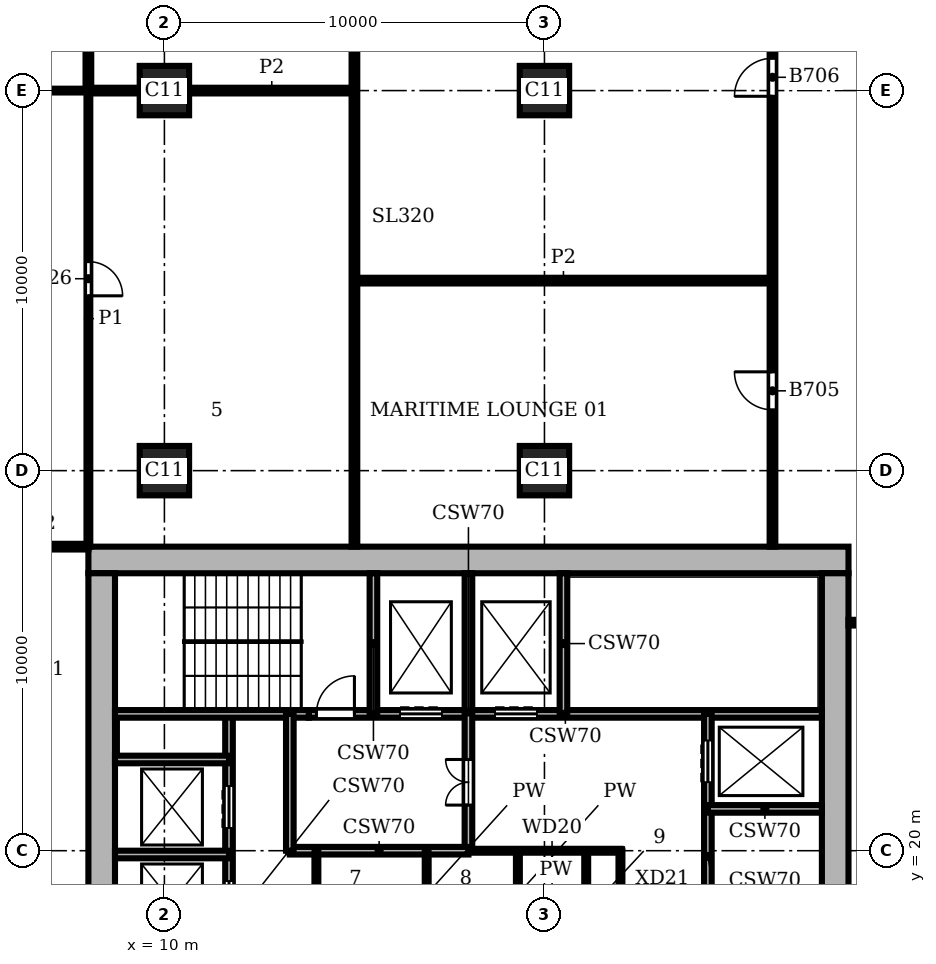
"""IFC4 building model, lengths in metres.
Left out: names, types, materials, properties, quantities, classifications, styles, units other than length and angle.
Written with IfcOpenShell. Run it as: python <this file> out.ifc"""

import sys

from ifc_helpers import new_model, si_unit, direction, frame, frame_2d, origin, origin_2d, place, context, subcontext, project, spatial, rectangle, extrude, element, fill, save


model = new_model("IFC4")
c1 = context("Model", 3, precision=1e-05, world=origin(), true_north=direction((0.0, 1.0)))
c2 = subcontext(c1, "Body", "Model", "MODEL_VIEW")
j1 = project(units=[si_unit("LENGTHUNIT", "METRE"), si_unit("PLANEANGLEUNIT", "RADIAN")], contexts=[c1])
p1 = place(None, origin())
s1 = spatial("IfcSite", under=j1, at=p1, CompositionType="ELEMENT")
p2 = place(p1, origin())
s2 = spatial("IfcBuilding", under=s1, at=p2, CompositionType="ELEMENT")
p3 = place(p2, frame((0.0, 0.0, 209.7)))
s3 = spatial("IfcBuildingStorey", under=s2, at=p3, CompositionType="ELEMENT", Elevation=209.7)
for number, where, z_axis, x_axis in (
    (1, (10.0, 30.0, 0.0), (0.0, 0.0, 1.0), (1.0, 0.0, 0.0)),
    (2, (10.0, 40.0, 0.0), (0.0, 0.0, 1.0), (1.0, 0.0, 0.0)),
    (3, (20.0, 30.0, 0.0), (0.0, 0.0, 1.0), (1.0, 0.0, 0.0)),
    (4, (20.0, 40.0, 0.0), (0.0, 0.0, 1.0), (1.0, 0.0, 0.0)),
):
    element("IfcColumn", number, at=place(p3, frame(where, z_axis=z_axis, x_axis=x_axis)), inside=s3, PredefinedType="COLUMN", context=c2, shape_type="SweptSolid", body=[
        extrude(rectangle(XDim=1.3, YDim=1.3, at=origin_2d()), origin(), (0.0, 0.0, 1.0), 3.9),
    ])
p4 = place(p3, frame((27.65, 8.7, 0.0), z_axis=(0.0, 0.0, 1.0), x_axis=(0.0, 1.0, 0.0)))
e5 = element("IfcWall", 5, at=p4, inside=s3, PredefinedType="SHEAR", context=c2, shape_type="SweptSolid", body=[
    extrude(rectangle(XDim=18.6, YDim=0.7, at=frame_2d((9.3, 0.0))), origin(), (0.0, 0.0, 1.0), 3.9),
])
p5 = place(p4, frame((4.75, 0.0, 0.0)))
e6 = element("IfcOpeningElement", 6, at=p5, cuts=e5, PredefinedType="OPENING", context=c2, shape_type="SweptSolid", body=[
    extrude(rectangle(XDim=1.6, YDim=2.1, at=frame_2d((0.8, 1.05))), frame((0.0, 0.36, 0.0), z_axis=(0.0, -1.0, 0.0), x_axis=(1.0, 0.0, 0.0)), (0.0, 0.0, 1.0), 0.72),
])
p6 = place(p3, frame((28.0, 27.65, 0.0), z_axis=(0.0, 0.0, 1.0), x_axis=(-1.0, 0.0, 0.0)))
e7 = element("IfcWall", 7, at=p6, inside=s3, PredefinedType="SHEAR", context=c2, shape_type="SweptSolid", body=[
    extrude(rectangle(XDim=20.0, YDim=0.7, at=frame_2d((10.0, 0.0))), origin(), (0.0, 0.0, 1.0), 3.9),
])
p7 = place(p3, frame((8.35, 27.3, 0.0), z_axis=(0.0, 0.0, 1.0), x_axis=(0.0, -1.0, 0.0)))
e8 = element("IfcWall", 8, at=p7, inside=s3, PredefinedType="SHEAR", context=c2, shape_type="SweptSolid", body=[
    extrude(rectangle(XDim=18.6, YDim=0.7, at=frame_2d((9.3, 0.0))), origin(), (0.0, 0.0, 1.0), 3.9),
])
p8 = place(p3, frame((8.7, 19.9, 0.0), z_axis=(0.0, 0.0, 1.0), x_axis=(1.0, 0.0, 0.0)))
e9 = element("IfcWall", 9, at=p8, inside=s3, PredefinedType="SHEAR", context=c2, shape_type="SweptSolid", body=[
    extrude(rectangle(XDim=3.0, YDim=0.2, at=frame_2d((1.5, 0.0))), origin(), (0.0, 0.0, 1.0), 3.58),
])
p9 = place(p3, frame((18.0, 20.0, 0.0), z_axis=(0.0, 0.0, 1.0), x_axis=(1.0, 0.0, 0.0)))
e10 = element("IfcWall", 10, at=p9, inside=s3, PredefinedType="PARTITIONING", context=c2, shape_type="SweptSolid", body=[
    extrude(rectangle(XDim=4.0, YDim=0.1, at=frame_2d((2.0, 0.0))), origin(), (0.0, 0.0, 1.0), 3.58),
])
p10 = place(p3, frame((13.3, 20.0, 0.0), z_axis=(0.0, 0.0, 1.0), x_axis=(1.0, 0.0, 0.0)))
e11 = element("IfcWall", 11, at=p10, inside=s3, PredefinedType="SHEAR", context=c2, shape_type="SweptSolid", body=[
    extrude(rectangle(XDim=4.7, YDim=0.2, at=frame_2d((2.35, 0.0))), origin(), (0.0, 0.0, 1.0), 3.58),
])
for number, where, z_axis, x_axis in (
    (12, (24.3, 21.1, 0.0), (0.0, 0.0, 1.0), (1.0, 0.0, 0.0)),
    (13, (8.7, 22.4, 0.0), (0.0, 0.0, 1.0), (1.0, 0.0, 0.0)),
):
    element("IfcWall", number, at=place(p3, frame(where, z_axis=z_axis, x_axis=x_axis)), inside=s3, PredefinedType="SHEAR", context=c2, shape_type="SweptSolid", body=[
        extrude(rectangle(XDim=3.0, YDim=0.2, at=frame_2d((1.5, 0.0))), origin(), (0.0, 0.0, 1.0), 3.58),
    ])
p11 = place(p3, frame((8.7, 23.6, 0.0), z_axis=(0.0, 0.0, 1.0), x_axis=(1.0, 0.0, 0.0)))
e14 = element("IfcWall", 14, at=p11, inside=s3, PredefinedType="SHEAR", context=c2, shape_type="SweptSolid", body=[
    extrude(rectangle(XDim=5.1, YDim=0.2, at=frame_2d((2.55, 0.0))), origin(), (0.0, 0.0, 1.0), 3.58),
])
p12 = place(p3, frame((13.8, 23.6, 0.0), z_axis=(0.0, 0.0, 1.0), x_axis=(1.0, 0.0, 0.0)))
e15 = element("IfcWall", 15, at=p12, inside=s3, PredefinedType="SHEAR", context=c2, shape_type="SweptSolid", body=[
    extrude(rectangle(XDim=13.5, YDim=0.2, at=frame_2d((6.75, 0.0))), origin(), (0.0, 0.0, 1.0), 3.58),
])
p13 = place(p12, frame((2.4, 0.0, 0.0)))
e16 = element("IfcOpeningElement", 16, at=p13, cuts=e15, PredefinedType="OPENING", context=c2, shape_type="SweptSolid", body=[
    extrude(rectangle(XDim=1.1, YDim=2.1, at=frame_2d((0.55, 1.05))), frame((0.0, 0.11, 0.0), z_axis=(0.0, -1.0, 0.0), x_axis=(1.0, 0.0, 0.0)), (0.0, 0.0, 1.0), 0.22),
])
p14 = place(p12, frame((4.9, 0.0, 0.0)))
e17 = element("IfcOpeningElement", 17, at=p14, cuts=e15, PredefinedType="OPENING", context=c2, shape_type="SweptSolid", body=[
    extrude(rectangle(XDim=1.1, YDim=2.1, at=frame_2d((0.55, 1.05))), frame((0.0, 0.11, 0.0), z_axis=(0.0, -1.0, 0.0), x_axis=(1.0, 0.0, 0.0)), (0.0, 0.0, 1.0), 0.22),
])
p15 = place(p12, frame((0.2, 0.0, 0.0)))
e18 = element("IfcOpeningElement", 18, at=p15, cuts=e15, PredefinedType="OPENING", context=c2, shape_type="SweptSolid", body=[
    extrude(rectangle(XDim=1.0, YDim=2.1, at=frame_2d((0.5, 1.05))), frame((0.0, 0.11, 0.0), z_axis=(0.0, -1.0, 0.0), x_axis=(1.0, 0.0, 0.0)), (0.0, 0.0, 1.0), 0.22),
])
p16 = place(p3, frame((11.7, 12.4, 0.0), z_axis=(0.0, 0.0, 1.0), x_axis=(0.0, 1.0, 0.0)))
e19 = element("IfcWall", 19, at=p16, inside=s3, PredefinedType="SHEAR", context=c2, shape_type="SweptSolid", body=[
    extrude(rectangle(XDim=11.2, YDim=0.2, at=frame_2d((5.6, 0.0))), origin(), (0.0, 0.0, 1.0), 3.58),
])
p17 = place(p16, frame((0.7, 0.0, 0.0)))
e20 = element("IfcOpeningElement", 20, at=p17, cuts=e19, PredefinedType="OPENING", context=c2, shape_type="SweptSolid", body=[
    extrude(rectangle(XDim=1.1, YDim=2.1, at=frame_2d((0.55, 1.05))), frame((0.0, 0.11, 0.0), z_axis=(0.0, -1.0, 0.0), x_axis=(1.0, 0.0, 0.0)), (0.0, 0.0, 1.0), 0.22),
])
p18 = place(p16, frame((3.2, 0.0, 0.0)))
e21 = element("IfcOpeningElement", 21, at=p18, cuts=e19, PredefinedType="OPENING", context=c2, shape_type="SweptSolid", body=[
    extrude(rectangle(XDim=1.1, YDim=2.1, at=frame_2d((0.55, 1.05))), frame((0.0, 0.11, 0.0), z_axis=(0.0, -1.0, 0.0), x_axis=(1.0, 0.0, 0.0)), (0.0, 0.0, 1.0), 0.22),
])
p19 = place(p16, frame((5.7, 0.0, 0.0)))
e22 = element("IfcOpeningElement", 22, at=p19, cuts=e19, PredefinedType="OPENING", context=c2, shape_type="SweptSolid", body=[
    extrude(rectangle(XDim=1.1, YDim=2.1, at=frame_2d((0.55, 1.05))), frame((0.0, 0.11, 0.0), z_axis=(0.0, -1.0, 0.0), x_axis=(1.0, 0.0, 0.0)), (0.0, 0.0, 1.0), 0.22),
])
p20 = place(p16, frame((8.2, 0.0, 0.0)))
e23 = element("IfcOpeningElement", 23, at=p20, cuts=e19, PredefinedType="OPENING", context=c2, shape_type="SweptSolid", body=[
    extrude(rectangle(XDim=1.1, YDim=2.1, at=frame_2d((0.55, 1.05))), frame((0.0, 0.11, 0.0), z_axis=(0.0, -1.0, 0.0), x_axis=(1.0, 0.0, 0.0)), (0.0, 0.0, 1.0), 0.22),
])
p21 = place(p3, frame((13.3, 20.0, 0.0), z_axis=(0.0, 0.0, 1.0), x_axis=(0.0, 1.0, 0.0)))
e24 = element("IfcWall", 24, at=p21, inside=s3, PredefinedType="SHEAR", context=c2, shape_type="SweptSolid", body=[
    extrude(rectangle(XDim=3.6, YDim=0.2, at=frame_2d((1.8, 0.0))), origin(), (0.0, 0.0, 1.0), 3.58),
])
p22 = place(p3, frame((14.0, 16.2, 0.0), z_axis=(0.0, 0.0, 1.0), x_axis=(0.0, 1.0, 0.0)))
e25 = element("IfcWall", 25, at=p22, inside=s3, PredefinedType="PARTITIONING", context=c2, shape_type="SweptSolid", body=[
    extrude(rectangle(XDim=3.8, YDim=0.1, at=frame_2d((1.9, 0.0))), origin(), (0.0, 0.0, 1.0), 3.58),
])
p23 = place(p3, frame((15.5, 23.6, 0.0), z_axis=(0.0, 0.0, 1.0), x_axis=(0.0, 1.0, 0.0)))
e26 = element("IfcWall", 26, at=p23, inside=s3, PredefinedType="SHEAR", context=c2, shape_type="SweptSolid", body=[
    extrude(rectangle(XDim=3.7, YDim=0.2, at=frame_2d((1.85, 0.0))), origin(), (0.0, 0.0, 1.0), 3.58),
])
p24 = place(p3, frame((16.9, 17.7, 0.0), z_axis=(0.0, 0.0, 1.0), x_axis=(0.0, 1.0, 0.0)))
e27 = element("IfcWall", 27, at=p24, inside=s3, PredefinedType="PARTITIONING", context=c2, shape_type="SweptSolid", body=[
    extrude(rectangle(XDim=2.3, YDim=0.1, at=frame_2d((1.15, 0.0))), origin(), (0.0, 0.0, 1.0), 3.58),
])
p25 = place(p3, frame((18.0, 20.0, 0.0), z_axis=(0.0, 0.0, 1.0), x_axis=(0.0, 1.0, 0.0)))
e28 = element("IfcWall", 28, at=p25, inside=s3, PredefinedType="SHEAR", context=c2, shape_type="SweptSolid", body=[
    extrude(rectangle(XDim=7.3, YDim=0.2, at=frame_2d((3.65, 0.0))), origin(), (0.0, 0.0, 1.0), 3.58),
])
p26 = place(p25, frame((1.2, 0.0, 0.0)))
e29 = element("IfcOpeningElement", 29, at=p26, cuts=e28, PredefinedType="OPENING", context=c2, shape_type="SweptSolid", body=[
    extrude(rectangle(XDim=1.2, YDim=2.1, at=frame_2d((0.6, 1.05))), frame((0.0, 0.11, 0.0), z_axis=(0.0, -1.0, 0.0), x_axis=(1.0, 0.0, 0.0)), (0.0, 0.0, 1.0), 0.22),
])
p27 = place(p3, frame((19.3, 17.7, 0.0), z_axis=(0.0, 0.0, 1.0), x_axis=(0.0, 1.0, 0.0)))
e30 = element("IfcWall", 30, at=p27, inside=s3, PredefinedType="PARTITIONING", context=c2, shape_type="SweptSolid", body=[
    extrude(rectangle(XDim=2.3, YDim=0.1, at=frame_2d((1.15, 0.0))), origin(), (0.0, 0.0, 1.0), 3.58),
])
p28 = place(p3, frame((20.5, 23.6, 0.0), z_axis=(0.0, 0.0, 1.0), x_axis=(0.0, 1.0, 0.0)))
e31 = element("IfcWall", 31, at=p28, inside=s3, PredefinedType="SHEAR", context=c2, shape_type="SweptSolid", body=[
    extrude(rectangle(XDim=3.7, YDim=0.2, at=frame_2d((1.85, 0.0))), origin(), (0.0, 0.0, 1.0), 3.58),
])
p29 = place(p3, frame((21.1, 17.7, 0.0), z_axis=(0.0, 0.0, 1.0), x_axis=(0.0, 1.0, 0.0)))
e32 = element("IfcWall", 32, at=p29, inside=s3, PredefinedType="PARTITIONING", context=c2, shape_type="SweptSolid", body=[
    extrude(rectangle(XDim=2.3, YDim=0.1, at=frame_2d((1.15, 0.0))), origin(), (0.0, 0.0, 1.0), 3.58),
])
p30 = place(p3, frame((22.0, 16.2, 0.0), z_axis=(0.0, 0.0, 1.0), x_axis=(0.0, 1.0, 0.0)))
e33 = element("IfcWall", 33, at=p30, inside=s3, PredefinedType="PARTITIONING", context=c2, shape_type="SweptSolid", body=[
    extrude(rectangle(XDim=3.8, YDim=0.1, at=frame_2d((1.9, 0.0))), origin(), (0.0, 0.0, 1.0), 3.58),
])
p31 = place(p30, frame((0.2, 0.0, 0.0)))
e34 = element("IfcOpeningElement", 34, at=p31, cuts=e33, PredefinedType="OPENING", context=c2, shape_type="SweptSolid", body=[
    extrude(rectangle(XDim=1.1, YDim=2.1, at=frame_2d((0.55, 1.05))), frame((0.0, 0.06, 0.0), z_axis=(0.0, -1.0, 0.0), x_axis=(1.0, 0.0, 0.0)), (0.0, 0.0, 1.0), 0.12),
])
p32 = place(p3, frame((24.3, 16.1, 0.0), z_axis=(0.0, 0.0, 1.0), x_axis=(0.0, 1.0, 0.0)))
e35 = element("IfcWall", 35, at=p32, inside=s3, PredefinedType="SHEAR", context=c2, shape_type="SweptSolid", body=[
    extrude(rectangle(XDim=7.5, YDim=0.2, at=frame_2d((3.75, 0.0))), origin(), (0.0, 0.0, 1.0), 3.58),
])
p33 = place(p32, frame((5.7, 0.0, 0.0)))
e36 = element("IfcOpeningElement", 36, at=p33, cuts=e35, PredefinedType="OPENING", context=c2, shape_type="SweptSolid", body=[
    extrude(rectangle(XDim=1.1, YDim=2.1, at=frame_2d((0.55, 1.05))), frame((0.0, 0.11, 0.0), z_axis=(0.0, -1.0, 0.0), x_axis=(1.0, 0.0, 0.0)), (0.0, 0.0, 1.0), 0.22),
])
p34 = place(p3, frame((8.0, 28.0, 0.0), z_axis=(0.0, 0.0, 1.0), x_axis=(0.0, 1.0, 0.0)))
e37 = element("IfcWall", 37, at=p34, inside=s3, PredefinedType="PARTITIONING", context=c2, shape_type="SweptSolid", body=[
    extrude(rectangle(XDim=12.0, YDim=0.1, at=frame_2d((6.0, 0.0))), origin(), (0.0, 0.0, 1.0), 3.58),
])
p35 = place(p34, frame((6.6, 0.0, 0.0)))
e38 = element("IfcOpeningElement", 38, at=p35, cuts=e37, PredefinedType="OPENING", context=c2, shape_type="SweptSolid", body=[
    extrude(rectangle(XDim=0.9, YDim=2.1, at=frame_2d((0.45, 1.05))), frame((0.0, 0.06, 0.0), z_axis=(0.0, -1.0, 0.0), x_axis=(1.0, 0.0, 0.0)), (0.0, 0.0, 1.0), 0.12),
])
p36 = place(p3, frame((0.45, 40.0, 0.0), z_axis=(0.0, 0.0, 1.0), x_axis=(1.0, 0.0, 0.0)))
e39 = element("IfcWall", 39, at=p36, inside=s3, PredefinedType="PARTITIONING", context=c2, shape_type="SweptSolid", body=[
    extrude(rectangle(XDim=7.55, YDim=0.1, at=frame_2d((3.775, 0.0))), origin(), (0.0, 0.0, 1.0), 3.58),
])
p37 = place(p36, frame((2.975, 0.0, 0.0)))
e40 = element("IfcOpeningElement", 40, at=p37, cuts=e39, PredefinedType="OPENING", context=c2, shape_type="SweptSolid", body=[
    extrude(rectangle(XDim=0.95, YDim=2.1, at=frame_2d((0.475, 1.05))), frame((0.0, 0.06, 0.0), z_axis=(0.0, -1.0, 0.0), x_axis=(1.0, 0.0, 0.0)), (0.0, 0.0, 1.0), 0.12),
])
p38 = place(p3, frame((8.0, 40.0, 0.0), z_axis=(0.0, 0.0, 1.0), x_axis=(0.0, 1.0, 0.0)))
e41 = element("IfcWall", 41, at=p38, inside=s3, PredefinedType="PARTITIONING", context=c2, shape_type="SweptSolid", body=[
    extrude(rectangle(XDim=10.0, YDim=0.15, at=frame_2d((5.0, 0.0))), origin(), (0.0, 0.0, 1.0), 3.58),
])
p39 = place(p3, frame((15.0, 28.0, 0.0), z_axis=(0.0, 0.0, 1.0), x_axis=(0.0, 1.0, 0.0)))
e42 = element("IfcWall", 42, at=p39, inside=s3, PredefinedType="PARTITIONING", context=c2, shape_type="SweptSolid", body=[
    extrude(rectangle(XDim=29.6, YDim=0.15, at=frame_2d((14.8, 0.0))), origin(), (0.0, 0.0, 1.0), 3.58),
])
p40 = place(p3, frame((26.0, 28.0, 0.0), z_axis=(0.0, 0.0, 1.0), x_axis=(0.0, 1.0, 0.0)))
e43 = element("IfcWall", 43, at=p40, inside=s3, PredefinedType="PARTITIONING", context=c2, shape_type="SweptSolid", body=[
    extrude(rectangle(XDim=29.6, YDim=0.15, at=frame_2d((14.8, 0.0))), origin(), (0.0, 0.0, 1.0), 3.58),
])
p41 = place(p40, frame((3.6, 0.0, 0.0)))
e44 = element("IfcOpeningElement", 44, at=p41, cuts=e43, PredefinedType="OPENING", context=c2, shape_type="SweptSolid", body=[
    extrude(rectangle(XDim=1.0, YDim=2.1, at=frame_2d((0.5, 1.05))), frame((0.0, 0.085, 0.0), z_axis=(0.0, -1.0, 0.0), x_axis=(1.0, 0.0, 0.0)), (0.0, 0.0, 1.0), 0.17),
])
p42 = place(p40, frame((11.85, 0.0, 0.0)))
e45 = element("IfcOpeningElement", 45, at=p42, cuts=e43, PredefinedType="OPENING", context=c2, shape_type="SweptSolid", body=[
    extrude(rectangle(XDim=1.0, YDim=2.1, at=frame_2d((0.5, 1.05))), frame((0.0, 0.085, 0.0), z_axis=(0.0, -1.0, 0.0), x_axis=(1.0, 0.0, 0.0)), (0.0, 0.0, 1.0), 0.17),
])
p43 = place(p40, frame((21.35, 0.0, 0.0)))
e46 = element("IfcOpeningElement", 46, at=p43, cuts=e43, PredefinedType="OPENING", context=c2, shape_type="SweptSolid", body=[
    extrude(rectangle(XDim=1.0, YDim=2.1, at=frame_2d((0.5, 1.05))), frame((0.0, 0.085, 0.0), z_axis=(0.0, -1.0, 0.0), x_axis=(1.0, 0.0, 0.0)), (0.0, 0.0, 1.0), 0.17),
])
p44 = place(p3, frame((28.0, 26.0, 0.0), z_axis=(0.0, 0.0, 1.0), x_axis=(1.0, 0.0, 0.0)))
e47 = element("IfcWall", 47, at=p44, inside=s3, PredefinedType="PARTITIONING", context=c2, shape_type="SweptSolid", body=[
    extrude(rectangle(XDim=2.8, YDim=0.15, at=frame_2d((1.4, 0.0))), origin(), (0.0, 0.0, 1.0), 3.58),
])
p45 = place(p3, frame((5.6, 28.0, 0.0), z_axis=(0.0, 0.0, 1.0), x_axis=(1.0, 0.0, 0.0)))
e48 = element("IfcWall", 48, at=p45, inside=s3, PredefinedType="PARTITIONING", context=c2, shape_type="SweptSolid", body=[
    extrude(rectangle(XDim=2.4, YDim=0.15, at=frame_2d((1.2, 0.0))), origin(), (0.0, 0.0, 1.0), 3.58),
])
p46 = place(p3, frame((15.0, 35.0, 0.0), z_axis=(0.0, 0.0, 1.0), x_axis=(1.0, 0.0, 0.0)))
e49 = element("IfcWall", 49, at=p46, inside=s3, PredefinedType="PARTITIONING", context=c2, shape_type="SweptSolid", body=[
    extrude(rectangle(XDim=11.0, YDim=0.15, at=frame_2d((5.5, 0.0))), origin(), (0.0, 0.0, 1.0), 3.58),
])
p47 = place(p3, frame((8.0, 40.0, 0.0), z_axis=(0.0, 0.0, 1.0), x_axis=(1.0, 0.0, 0.0)))
e50 = element("IfcWall", 50, at=p47, inside=s3, PredefinedType="PARTITIONING", context=c2, shape_type="SweptSolid", body=[
    extrude(rectangle(XDim=1.35, YDim=0.15, at=frame_2d((0.675, 0.0))), origin(), (0.0, 0.0, 1.0), 3.58),
])
p48 = place(p3, frame((10.65, 40.0, 0.0), z_axis=(0.0, 0.0, 1.0), x_axis=(1.0, 0.0, 0.0)))
e51 = element("IfcWall", 51, at=p48, inside=s3, PredefinedType="PARTITIONING", context=c2, shape_type="SweptSolid", body=[
    extrude(rectangle(XDim=4.35, YDim=0.15, at=frame_2d((2.175, 0.0))), origin(), (0.0, 0.0, 1.0), 3.58),
])
p49 = place(p19, origin())
e52 = element("IfcDoor", 52, at=p49, inside=s3, OperationType="DOUBLE_DOOR_SLIDING", PredefinedType="DOOR", context=c2, shape_type="SweptSolid", body=[
    extrude(rectangle(XDim=1.1, YDim=2.1, at=frame_2d((0.55, 1.05))), frame((0.0, 0.025, 0.0), z_axis=(0.0, -1.0, 0.0), x_axis=(1.0, 0.0, 0.0)), (0.0, 0.0, 1.0), 0.05),
])
fill(e22, e52)
p50 = place(p20, origin())
e53 = element("IfcDoor", 53, at=p50, inside=s3, OperationType="DOUBLE_DOOR_SLIDING", PredefinedType="DOOR", context=c2, shape_type="SweptSolid", body=[
    extrude(rectangle(XDim=1.1, YDim=2.1, at=frame_2d((0.55, 1.05))), frame((0.0, 0.025, 0.0), z_axis=(0.0, -1.0, 0.0), x_axis=(1.0, 0.0, 0.0)), (0.0, 0.0, 1.0), 0.05),
])
fill(e23, e53)
p51 = place(p33, origin())
e54 = element("IfcDoor", 54, at=p51, inside=s3, OperationType="DOUBLE_DOOR_SLIDING", PredefinedType="DOOR", context=c2, shape_type="SweptSolid", body=[
    extrude(rectangle(XDim=1.1, YDim=2.1, at=frame_2d((0.55, 1.05))), frame((0.0, 0.025, 0.0), z_axis=(0.0, -1.0, 0.0), x_axis=(1.0, 0.0, 0.0)), (0.0, 0.0, 1.0), 0.05),
])
fill(e36, e54)
p52 = place(p13, origin())
e55 = element("IfcDoor", 55, at=p52, inside=s3, OperationType="DOUBLE_DOOR_SLIDING", PredefinedType="DOOR", context=c2, shape_type="SweptSolid", body=[
    extrude(rectangle(XDim=1.1, YDim=2.1, at=frame_2d((0.55, 1.05))), frame((0.0, 0.025, 0.0), z_axis=(0.0, -1.0, 0.0), x_axis=(1.0, 0.0, 0.0)), (0.0, 0.0, 1.0), 0.05),
])
fill(e16, e55)
p53 = place(p14, origin())
e56 = element("IfcDoor", 56, at=p53, inside=s3, OperationType="DOUBLE_DOOR_SLIDING", PredefinedType="DOOR", context=c2, shape_type="SweptSolid", body=[
    extrude(rectangle(XDim=1.1, YDim=2.1, at=frame_2d((0.55, 1.05))), frame((0.0, 0.025, 0.0), z_axis=(0.0, -1.0, 0.0), x_axis=(1.0, 0.0, 0.0)), (0.0, 0.0, 1.0), 0.05),
])
fill(e17, e56)
p54 = place(p15, origin())
e57 = element("IfcDoor", 57, at=p54, inside=s3, OperationType="SINGLE_SWING_RIGHT", PredefinedType="DOOR", context=c2, shape_type="SweptSolid", body=[
    extrude(rectangle(XDim=1.0, YDim=2.1, at=frame_2d((0.5, 1.05))), frame((0.0, 0.025, 0.0), z_axis=(0.0, -1.0, 0.0), x_axis=(1.0, 0.0, 0.0)), (0.0, 0.0, 1.0), 0.05),
])
fill(e18, e57)
p55 = place(p26, origin())
e58 = element("IfcDoor", 58, at=p55, inside=s3, OperationType="DOUBLE_DOOR_SINGLE_SWING", PredefinedType="DOOR", context=c2, shape_type="SweptSolid", body=[
    extrude(rectangle(XDim=1.2, YDim=2.1, at=frame_2d((0.6, 1.05))), frame((0.0, 0.025, 0.0), z_axis=(0.0, -1.0, 0.0), x_axis=(1.0, 0.0, 0.0)), (0.0, 0.0, 1.0), 0.05),
])
fill(e29, e58)
p56 = place(p41, origin())
e59 = element("IfcDoor", 59, at=p56, inside=s3, OperationType="SINGLE_SWING_RIGHT", PredefinedType="DOOR", context=c2, shape_type="SweptSolid", body=[
    extrude(rectangle(XDim=1.0, YDim=2.1, at=frame_2d((0.5, 1.05))), frame((0.0, 0.025, 0.0), z_axis=(0.0, -1.0, 0.0), x_axis=(1.0, 0.0, 0.0)), (0.0, 0.0, 1.0), 0.05),
])
fill(e44, e59)
p57 = place(p42, origin())
e60 = element("IfcDoor", 60, at=p57, inside=s3, OperationType="SINGLE_SWING_LEFT", PredefinedType="DOOR", context=c2, shape_type="SweptSolid", body=[
    extrude(rectangle(XDim=1.0, YDim=2.1, at=frame_2d((0.5, 1.05))), frame((0.0, 0.025, 0.0), z_axis=(0.0, -1.0, 0.0), x_axis=(1.0, 0.0, 0.0)), (0.0, 0.0, 1.0), 0.05),
])
fill(e45, e60)
p58 = place(p35, frame((0.9, 0.0, 0.0), z_axis=(0.0, 0.0, 1.0), x_axis=(-1.0, 0.0, 0.0)))
e61 = element("IfcDoor", 61, at=p58, inside=s3, OperationType="SINGLE_SWING_RIGHT", PredefinedType="DOOR", context=c2, shape_type="SweptSolid", body=[
    extrude(rectangle(XDim=0.9, YDim=2.1, at=frame_2d((0.45, 1.05))), frame((0.0, 0.025, 0.0), z_axis=(0.0, -1.0, 0.0), x_axis=(1.0, 0.0, 0.0)), (0.0, 0.0, 1.0), 0.05),
])
fill(e38, e61)
save(model, sys.argv[1])
